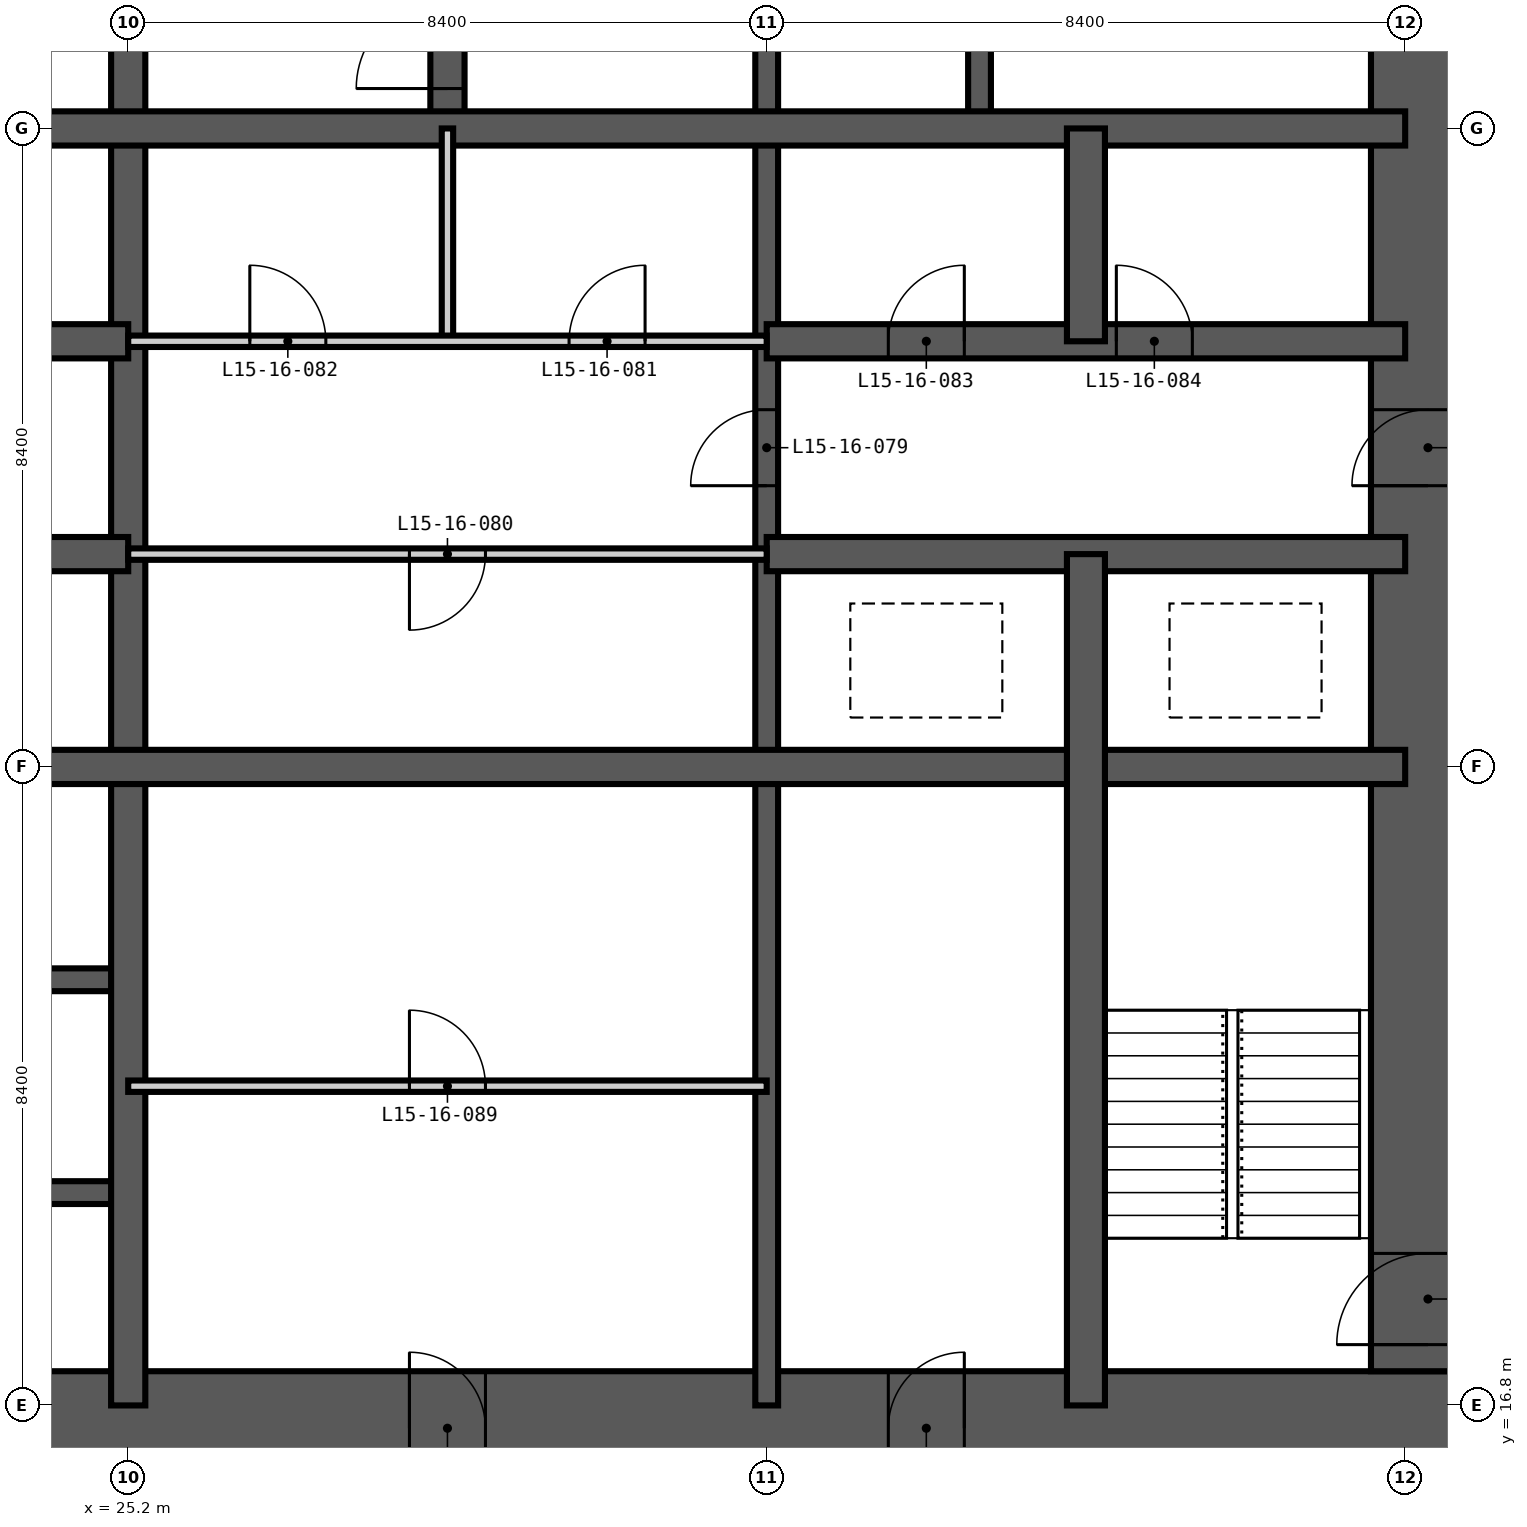
"""IFC4 building model, lengths in metres.
Left out: names, types, materials, properties, quantities, classifications, styles, units other than length and angle.
Written with IfcOpenShell. Run it as: python <this file> out.ifc"""

import sys

from ifc_helpers import new_model, si_unit, direction, frame, frame_2d, origin, place, context, subcontext, project, spatial, rectangle, extrude, element, fill, save


model = new_model("IFC4")
c1 = context("Model", 3, precision=1e-05, world=origin(), true_north=direction((0.0, 1.0)))
c2 = subcontext(c1, "Body", "Model", "MODEL_VIEW")
j1 = project(units=[si_unit("LENGTHUNIT", "METRE"), si_unit("PLANEANGLEUNIT", "RADIAN")], contexts=[c1])
p1 = place(None, origin())
s1 = spatial("IfcSite", under=j1, at=p1, CompositionType="ELEMENT")
p2 = place(p1, origin())
s2 = spatial("IfcBuilding", under=s1, at=p2, CompositionType="ELEMENT")
p3 = place(p2, frame((0.0, 0.0, 63.0)))
s3 = spatial("IfcBuildingStorey", under=s2, at=p3, CompositionType="ELEMENT", Elevation=63.0)
p4 = place(p3, frame((15.75, 16.5, -0.35), z_axis=(0.0, 0.0, 1.0), x_axis=(1.0, 0.0, 0.0)))
e1 = element("IfcWall", 1, at=p4, inside=s3, PredefinedType="SHEAR", context=c2, shape_type="SweptSolid", body=[
    extrude(rectangle(XDim=27.3, YDim=1.5, at=frame_2d((13.65, 0.0))), origin(), (0.0, 0.0, 1.0), 3.6),
])
p5 = place(p4, frame((13.15, 0.0, 0.35)))
e2 = element("IfcOpeningElement", 2, at=p5, cuts=e1, PredefinedType="OPENING", context=c2, shape_type="SweptSolid", body=[
    extrude(rectangle(XDim=1.0, YDim=2.1, at=frame_2d((0.5, 1.05))), frame((0.0, 0.76, 0.0), z_axis=(0.0, -1.0, 0.0), x_axis=(1.0, 0.0, 0.0)), (0.0, 0.0, 1.0), 1.52),
])
p6 = place(p4, frame((19.45, 0.0, 0.35)))
e3 = element("IfcOpeningElement", 3, at=p6, cuts=e1, PredefinedType="OPENING", context=c2, shape_type="SweptSolid", body=[
    extrude(rectangle(XDim=1.0, YDim=2.1, at=frame_2d((0.5, 1.05))), frame((0.0, 0.76, 0.0), z_axis=(0.0, -1.0, 0.0), x_axis=(1.0, 0.0, 0.0)), (0.0, 0.0, 1.0), 1.52),
])
p7 = place(p3, frame((42.3, 17.25, -0.35), z_axis=(0.0, 0.0, 1.0), x_axis=(0.0, 1.0, 0.0)))
e4 = element("IfcWall", 4, at=p7, inside=s3, PredefinedType="SHEAR", context=c2, shape_type="SweptSolid", body=[
    extrude(rectangle(XDim=24.3, YDim=1.5, at=frame_2d((12.15, 0.0))), origin(), (0.0, 0.0, 1.0), 3.6),
])
p8 = place(p7, frame((0.35, 0.0, 0.35)))
e5 = element("IfcOpeningElement", 5, at=p8, cuts=e4, PredefinedType="OPENING", context=c2, shape_type="SweptSolid", body=[
    extrude(rectangle(XDim=1.2, YDim=2.2, at=frame_2d((0.6, 1.1))), frame((0.0, 0.76, 0.0), z_axis=(0.0, -1.0, 0.0), x_axis=(1.0, 0.0, 0.0)), (0.0, 0.0, 1.0), 1.52),
])
p9 = place(p7, frame((11.65, 0.0, 0.35)))
e6 = element("IfcOpeningElement", 6, at=p9, cuts=e4, PredefinedType="OPENING", context=c2, shape_type="SweptSolid", body=[
    extrude(rectangle(XDim=1.0, YDim=2.1, at=frame_2d((0.5, 1.05))), frame((0.0, 0.76, 0.0), z_axis=(0.0, -1.0, 0.0), x_axis=(1.0, 0.0, 0.0)), (0.0, 0.0, 1.0), 1.52),
])
p10 = place(p7, frame((20.05, 0.0, 0.35)))
e7 = element("IfcOpeningElement", 7, at=p10, cuts=e4, PredefinedType="OPENING", context=c2, shape_type="SweptSolid", body=[
    extrude(rectangle(XDim=1.0, YDim=2.1, at=frame_2d((0.5, 1.05))), frame((0.0, 0.76, 0.0), z_axis=(0.0, -1.0, 0.0), x_axis=(1.0, 0.0, 0.0)), (0.0, 0.0, 1.0), 1.52),
])
p11 = place(p3, frame((33.6, 16.8, -0.35), z_axis=(0.0, 0.0, 1.0), x_axis=(0.0, 1.0, 0.0)))
e8 = element("IfcWall", 8, at=p11, inside=s3, PredefinedType="SHEAR", context=c2, shape_type="SweptSolid", body=[
    extrude(rectangle(XDim=25.2, YDim=0.3, at=frame_2d((12.6, 0.0))), origin(), (0.0, 0.0, 1.0), 3.6),
])
p12 = place(p11, frame((22.5, 0.0, 0.35)))
e9 = element("IfcOpeningElement", 9, at=p12, cuts=e8, PredefinedType="OPENING", context=c2, shape_type="SweptSolid", body=[
    extrude(rectangle(XDim=1.2, YDim=2.2, at=frame_2d((0.6, 1.1))), frame((0.0, 0.16, 0.0), z_axis=(0.0, -1.0, 0.0), x_axis=(1.0, 0.0, 0.0)), (0.0, 0.0, 1.0), 0.32),
])
p13 = place(p11, frame((18.3, 0.0, 0.35)))
e10 = element("IfcOpeningElement", 10, at=p13, cuts=e8, PredefinedType="OPENING", context=c2, shape_type="SweptSolid", body=[
    extrude(rectangle(XDim=1.2, YDim=2.2, at=frame_2d((0.6, 1.1))), frame((0.0, 0.16, 0.0), z_axis=(0.0, -1.0, 0.0), x_axis=(1.0, 0.0, 0.0)), (0.0, 0.0, 1.0), 0.32),
])
p14 = place(p11, frame((12.1, 0.0, 0.35)))
e11 = element("IfcOpeningElement", 11, at=p14, cuts=e8, PredefinedType="OPENING", context=c2, shape_type="SweptSolid", body=[
    extrude(rectangle(XDim=1.0, YDim=2.1, at=frame_2d((0.5, 1.05))), frame((0.0, 0.16, 0.0), z_axis=(0.0, -1.0, 0.0), x_axis=(1.0, 0.0, 0.0)), (0.0, 0.0, 1.0), 0.32),
])
for number, where, z_axis, x_axis in (
    (12, (36.4, 33.6, -0.35), (0.0, 0.0, 1.0), (0.0, 1.0, 0.0)),
    (13, (16.8, 19.6, -0.35), (0.0, 0.0, 1.0), (1.0, 0.0, 0.0)),
    (14, (16.8, 22.4, -0.35), (0.0, 0.0, 1.0), (1.0, 0.0, 0.0)),
):
    element("IfcWall", number, at=place(p3, frame(where, z_axis=z_axis, x_axis=x_axis)), inside=s3, PredefinedType="SHEAR", context=c2, shape_type="SweptSolid", body=[
        extrude(rectangle(XDim=8.4, YDim=0.3, at=frame_2d((4.2, 0.0))), origin(), (0.0, 0.0, 1.0), 3.6),
    ])
p15 = place(p3, frame((25.2, 16.8, -0.35), z_axis=(0.0, 0.0, 1.0), x_axis=(0.0, 1.0, 0.0)))
e15 = element("IfcWall", 15, at=p15, inside=s3, PredefinedType="SHEAR", context=c2, shape_type="SweptSolid", body=[
    extrude(rectangle(XDim=25.2, YDim=0.45, at=frame_2d((12.6, 0.0))), origin(), (0.0, 0.0, 1.0), 3.6),
])
p16 = place(p3, frame((29.4, 33.6, -0.35), z_axis=(0.0, 0.0, 1.0), x_axis=(0.0, 1.0, 0.0)))
e16 = element("IfcWall", 16, at=p16, inside=s3, PredefinedType="SHEAR", context=c2, shape_type="SweptSolid", body=[
    extrude(rectangle(XDim=8.4, YDim=0.45, at=frame_2d((4.2, 0.0))), origin(), (0.0, 0.0, 1.0), 3.6),
])
p17 = place(p16, frame((0.525, 0.0, 0.35)))
e17 = element("IfcOpeningElement", 17, at=p17, cuts=e16, PredefinedType="OPENING", context=c2, shape_type="SweptSolid", body=[
    extrude(rectangle(XDim=1.2, YDim=2.2, at=frame_2d((0.6, 1.1))), frame((0.0, 0.235, 0.0), z_axis=(0.0, -1.0, 0.0), x_axis=(1.0, 0.0, 0.0)), (0.0, 0.0, 1.0), 0.47),
])
p18 = place(p3, frame((16.8, 25.2, -0.35), z_axis=(0.0, 0.0, 1.0), x_axis=(1.0, 0.0, 0.0)))
e18 = element("IfcWall", 18, at=p18, inside=s3, PredefinedType="SHEAR", context=c2, shape_type="SweptSolid", body=[
    extrude(rectangle(XDim=25.2, YDim=0.45, at=frame_2d((12.6, 0.0))), origin(), (0.0, 0.0, 1.0), 3.6),
])
p19 = place(p3, frame((16.8, 28.0, -0.35), z_axis=(0.0, 0.0, 1.0), x_axis=(1.0, 0.0, 0.0)))
e19 = element("IfcWall", 19, at=p19, inside=s3, PredefinedType="SHEAR", context=c2, shape_type="SweptSolid", body=[
    extrude(rectangle(XDim=8.4, YDim=0.45, at=frame_2d((4.2, 0.0))), origin(), (0.0, 0.0, 1.0), 3.6),
])
p20 = place(p19, frame((1.55, 0.0, 0.35)))
e20 = element("IfcOpeningElement", 20, at=p20, cuts=e19, PredefinedType="OPENING", context=c2, shape_type="SweptSolid", body=[
    extrude(rectangle(XDim=1.1, YDim=2.2, at=frame_2d((0.55, 1.1))), frame((0.0, 0.235, 0.0), z_axis=(0.0, -1.0, 0.0), x_axis=(1.0, 0.0, 0.0)), (0.0, 0.0, 1.0), 0.47),
])
p21 = place(p19, frame((5.75, 0.0, 0.35)))
e21 = element("IfcOpeningElement", 21, at=p21, cuts=e19, PredefinedType="OPENING", context=c2, shape_type="SweptSolid", body=[
    extrude(rectangle(XDim=1.1, YDim=2.2, at=frame_2d((0.55, 1.1))), frame((0.0, 0.235, 0.0), z_axis=(0.0, -1.0, 0.0), x_axis=(1.0, 0.0, 0.0)), (0.0, 0.0, 1.0), 0.47),
])
p22 = place(p3, frame((33.6, 28.0, -0.35), z_axis=(0.0, 0.0, 1.0), x_axis=(1.0, 0.0, 0.0)))
e22 = element("IfcWall", 22, at=p22, inside=s3, PredefinedType="SHEAR", context=c2, shape_type="SweptSolid", body=[
    extrude(rectangle(XDim=8.4, YDim=0.45, at=frame_2d((4.2, 0.0))), origin(), (0.0, 0.0, 1.0), 3.6),
])
p23 = place(p3, frame((16.8, 30.8, -0.35), z_axis=(0.0, 0.0, 1.0), x_axis=(1.0, 0.0, 0.0)))
e23 = element("IfcWall", 23, at=p23, inside=s3, PredefinedType="SHEAR", context=c2, shape_type="SweptSolid", body=[
    extrude(rectangle(XDim=8.4, YDim=0.45, at=frame_2d((4.2, 0.0))), origin(), (0.0, 0.0, 1.0), 3.6),
])
p24 = place(p23, frame((1.55, 0.0, 0.35)))
e24 = element("IfcOpeningElement", 24, at=p24, cuts=e23, PredefinedType="OPENING", context=c2, shape_type="SweptSolid", body=[
    extrude(rectangle(XDim=1.1, YDim=2.2, at=frame_2d((0.55, 1.1))), frame((0.0, 0.235, 0.0), z_axis=(0.0, -1.0, 0.0), x_axis=(1.0, 0.0, 0.0)), (0.0, 0.0, 1.0), 0.47),
])
p25 = place(p23, frame((5.75, 0.0, 0.35)))
e25 = element("IfcOpeningElement", 25, at=p25, cuts=e23, PredefinedType="OPENING", context=c2, shape_type="SweptSolid", body=[
    extrude(rectangle(XDim=1.1, YDim=2.2, at=frame_2d((0.55, 1.1))), frame((0.0, 0.235, 0.0), z_axis=(0.0, -1.0, 0.0), x_axis=(1.0, 0.0, 0.0)), (0.0, 0.0, 1.0), 0.47),
])
p26 = place(p3, frame((33.6, 30.8, -0.35), z_axis=(0.0, 0.0, 1.0), x_axis=(1.0, 0.0, 0.0)))
e26 = element("IfcWall", 26, at=p26, inside=s3, PredefinedType="SHEAR", context=c2, shape_type="SweptSolid", body=[
    extrude(rectangle(XDim=8.4, YDim=0.45, at=frame_2d((4.2, 0.0))), origin(), (0.0, 0.0, 1.0), 3.6),
])
p27 = place(p26, frame((1.6, 0.0, 0.35)))
e27 = element("IfcOpeningElement", 27, at=p27, cuts=e26, PredefinedType="OPENING", context=c2, shape_type="SweptSolid", body=[
    extrude(rectangle(XDim=1.0, YDim=2.1, at=frame_2d((0.5, 1.05))), frame((0.0, 0.235, 0.0), z_axis=(0.0, -1.0, 0.0), x_axis=(1.0, 0.0, 0.0)), (0.0, 0.0, 1.0), 0.47),
])
p28 = place(p26, frame((4.6, 0.0, 0.35)))
e28 = element("IfcOpeningElement", 28, at=p28, cuts=e26, PredefinedType="OPENING", context=c2, shape_type="SweptSolid", body=[
    extrude(rectangle(XDim=1.0, YDim=2.1, at=frame_2d((0.5, 1.05))), frame((0.0, 0.235, 0.0), z_axis=(0.0, -1.0, 0.0), x_axis=(1.0, 0.0, 0.0)), (0.0, 0.0, 1.0), 0.47),
])
p29 = place(p3, frame((16.8, 33.6, -0.35), z_axis=(0.0, 0.0, 1.0), x_axis=(1.0, 0.0, 0.0)))
e29 = element("IfcWall", 29, at=p29, inside=s3, PredefinedType="SHEAR", context=c2, shape_type="SweptSolid", body=[
    extrude(rectangle(XDim=25.2, YDim=0.45, at=frame_2d((12.6, 0.0))), origin(), (0.0, 0.0, 1.0), 3.6),
])
p30 = place(p3, frame((37.8, 16.8, -0.35), z_axis=(0.0, 0.0, 1.0), x_axis=(0.0, 1.0, 0.0)))
e30 = element("IfcWall", 30, at=p30, inside=s3, PredefinedType="SHEAR", context=c2, shape_type="SweptSolid", body=[
    extrude(rectangle(XDim=11.2, YDim=0.5, at=frame_2d((5.6, 0.0))), origin(), (0.0, 0.0, 1.0), 3.6),
])
p31 = place(p3, frame((37.8, 30.8, -0.35), z_axis=(0.0, 0.0, 1.0), x_axis=(0.0, 1.0, 0.0)))
e31 = element("IfcWall", 31, at=p31, inside=s3, PredefinedType="SHEAR", context=c2, shape_type="SweptSolid", body=[
    extrude(rectangle(XDim=2.8, YDim=0.5, at=frame_2d((1.4, 0.0))), origin(), (0.0, 0.0, 1.0), 3.6),
])
p32 = place(p3, frame((29.4, 30.8, 0.0), z_axis=(0.0, 0.0, 1.0), x_axis=(0.0, 1.0, 0.0)))
e32 = element("IfcWall", 32, at=p32, inside=s3, PredefinedType="PARTITIONING", context=c2, shape_type="SweptSolid", body=[
    extrude(rectangle(XDim=2.8, YDim=0.15, at=frame_2d((1.4, 0.0))), origin(), (0.0, 0.0, 1.0), 3.25),
])
p33 = place(p3, frame((25.2, 21.0, 0.0), z_axis=(0.0, 0.0, 1.0), x_axis=(1.0, 0.0, 0.0)))
e33 = element("IfcWall", 33, at=p33, inside=s3, PredefinedType="PARTITIONING", context=c2, shape_type="SweptSolid", body=[
    extrude(rectangle(XDim=8.4, YDim=0.15, at=frame_2d((4.2, 0.0))), origin(), (0.0, 0.0, 1.0), 3.25),
])
p34 = place(p33, frame((3.7, 0.0, 0.0)))
e34 = element("IfcOpeningElement", 34, at=p34, cuts=e33, PredefinedType="OPENING", context=c2, shape_type="SweptSolid", body=[
    extrude(rectangle(XDim=1.0, YDim=2.1, at=frame_2d((0.5, 1.05))), frame((0.0, 0.085, 0.0), z_axis=(0.0, -1.0, 0.0), x_axis=(1.0, 0.0, 0.0)), (0.0, 0.0, 1.0), 0.17),
])
p35 = place(p3, frame((25.2, 28.0, 0.0), z_axis=(0.0, 0.0, 1.0), x_axis=(1.0, 0.0, 0.0)))
e35 = element("IfcWall", 35, at=p35, inside=s3, PredefinedType="PARTITIONING", context=c2, shape_type="SweptSolid", body=[
    extrude(rectangle(XDim=8.4, YDim=0.15, at=frame_2d((4.2, 0.0))), origin(), (0.0, 0.0, 1.0), 3.25),
])
p36 = place(p35, frame((3.7, 0.0, 0.0)))
e36 = element("IfcOpeningElement", 36, at=p36, cuts=e35, PredefinedType="OPENING", context=c2, shape_type="SweptSolid", body=[
    extrude(rectangle(XDim=1.0, YDim=2.1, at=frame_2d((0.5, 1.05))), frame((0.0, 0.085, 0.0), z_axis=(0.0, -1.0, 0.0), x_axis=(1.0, 0.0, 0.0)), (0.0, 0.0, 1.0), 0.17),
])
p37 = place(p3, frame((25.2, 30.8, 0.0), z_axis=(0.0, 0.0, 1.0), x_axis=(1.0, 0.0, 0.0)))
e37 = element("IfcWall", 37, at=p37, inside=s3, PredefinedType="PARTITIONING", context=c2, shape_type="SweptSolid", body=[
    extrude(rectangle(XDim=8.4, YDim=0.15, at=frame_2d((4.2, 0.0))), origin(), (0.0, 0.0, 1.0), 3.25),
])
p38 = place(p37, frame((5.8, 0.0, 0.0)))
e38 = element("IfcOpeningElement", 38, at=p38, cuts=e37, PredefinedType="OPENING", context=c2, shape_type="SweptSolid", body=[
    extrude(rectangle(XDim=1.0, YDim=2.1, at=frame_2d((0.5, 1.05))), frame((0.0, 0.085, 0.0), z_axis=(0.0, -1.0, 0.0), x_axis=(1.0, 0.0, 0.0)), (0.0, 0.0, 1.0), 0.17),
])
p39 = place(p37, frame((1.6, 0.0, 0.0)))
e39 = element("IfcOpeningElement", 39, at=p39, cuts=e37, PredefinedType="OPENING", context=c2, shape_type="SweptSolid", body=[
    extrude(rectangle(XDim=1.0, YDim=2.1, at=frame_2d((0.5, 1.05))), frame((0.0, 0.085, 0.0), z_axis=(0.0, -1.0, 0.0), x_axis=(1.0, 0.0, 0.0)), (0.0, 0.0, 1.0), 0.17),
])
p40 = place(p17, origin())
e40 = element("IfcDoor", 40, at=p40, inside=s3, OperationType="SINGLE_SWING_LEFT", PredefinedType="DOOR", context=c2, shape_type="SweptSolid", body=[
    extrude(rectangle(XDim=1.2, YDim=2.2, at=frame_2d((0.6, 1.1))), frame((0.0, 0.025, 0.0), z_axis=(0.0, -1.0, 0.0), x_axis=(1.0, 0.0, 0.0)), (0.0, 0.0, 1.0), 0.05),
])
fill(e17, e40)
p41 = place(p8, origin())
e41 = element("IfcDoor", 41, at=p41, inside=s3, OperationType="SINGLE_SWING_LEFT", PredefinedType="DOOR", context=c2, shape_type="SweptSolid", body=[
    extrude(rectangle(XDim=1.2, YDim=2.2, at=frame_2d((0.6, 1.1))), frame((0.0, 0.025, 0.0), z_axis=(0.0, -1.0, 0.0), x_axis=(1.0, 0.0, 0.0)), (0.0, 0.0, 1.0), 0.05),
])
fill(e5, e41)
p42 = place(p14, origin())
e42 = element("IfcDoor", 42, at=p42, inside=s3, OperationType="SINGLE_SWING_LEFT", PredefinedType="DOOR", context=c2, shape_type="SweptSolid", body=[
    extrude(rectangle(XDim=1.0, YDim=2.1, at=frame_2d((0.5, 1.05))), frame((0.0, 0.025, 0.0), z_axis=(0.0, -1.0, 0.0), x_axis=(1.0, 0.0, 0.0)), (0.0, 0.0, 1.0), 0.05),
])
fill(e11, e42)
p43 = place(p36, frame((1.0, 0.0, 0.0), z_axis=(0.0, 0.0, 1.0), x_axis=(-1.0, 0.0, 0.0)))
e43 = element("IfcDoor", 43, at=p43, inside=s3, OperationType="SINGLE_SWING_RIGHT", PredefinedType="DOOR", context=c2, shape_type="SweptSolid", body=[
    extrude(rectangle(XDim=1.0, YDim=2.1, at=frame_2d((0.5, 1.05))), frame((0.0, 0.025, 0.0), z_axis=(0.0, -1.0, 0.0), x_axis=(1.0, 0.0, 0.0)), (0.0, 0.0, 1.0), 0.05),
])
fill(e36, e43)
p44 = place(p38, origin())
e44 = element("IfcDoor", 44, at=p44, inside=s3, OperationType="SINGLE_SWING_RIGHT", PredefinedType="DOOR", context=c2, shape_type="SweptSolid", body=[
    extrude(rectangle(XDim=1.0, YDim=2.1, at=frame_2d((0.5, 1.05))), frame((0.0, 0.025, 0.0), z_axis=(0.0, -1.0, 0.0), x_axis=(1.0, 0.0, 0.0)), (0.0, 0.0, 1.0), 0.05),
])
fill(e38, e44)
p45 = place(p39, origin())
e45 = element("IfcDoor", 45, at=p45, inside=s3, OperationType="SINGLE_SWING_LEFT", PredefinedType="DOOR", context=c2, shape_type="SweptSolid", body=[
    extrude(rectangle(XDim=1.0, YDim=2.1, at=frame_2d((0.5, 1.05))), frame((0.0, 0.025, 0.0), z_axis=(0.0, -1.0, 0.0), x_axis=(1.0, 0.0, 0.0)), (0.0, 0.0, 1.0), 0.05),
])
fill(e39, e45)
p46 = place(p27, origin())
e46 = element("IfcDoor", 46, at=p46, inside=s3, OperationType="SINGLE_SWING_RIGHT", PredefinedType="DOOR", context=c2, shape_type="SweptSolid", body=[
    extrude(rectangle(XDim=1.0, YDim=2.1, at=frame_2d((0.5, 1.05))), frame((0.0, 0.025, 0.0), z_axis=(0.0, -1.0, 0.0), x_axis=(1.0, 0.0, 0.0)), (0.0, 0.0, 1.0), 0.05),
])
fill(e27, e46)
p47 = place(p28, origin())
e47 = element("IfcDoor", 47, at=p47, inside=s3, OperationType="SINGLE_SWING_LEFT", PredefinedType="DOOR", context=c2, shape_type="SweptSolid", body=[
    extrude(rectangle(XDim=1.0, YDim=2.1, at=frame_2d((0.5, 1.05))), frame((0.0, 0.025, 0.0), z_axis=(0.0, -1.0, 0.0), x_axis=(1.0, 0.0, 0.0)), (0.0, 0.0, 1.0), 0.05),
])
fill(e28, e47)
p48 = place(p9, origin())
e48 = element("IfcDoor", 48, at=p48, inside=s3, OperationType="SINGLE_SWING_LEFT", PredefinedType="DOOR", context=c2, shape_type="SweptSolid", body=[
    extrude(rectangle(XDim=1.0, YDim=2.1, at=frame_2d((0.5, 1.05))), frame((0.0, 0.025, 0.0), z_axis=(0.0, -1.0, 0.0), x_axis=(1.0, 0.0, 0.0)), (0.0, 0.0, 1.0), 0.05),
])
fill(e6, e48)
p49 = place(p5, origin())
e49 = element("IfcDoor", 49, at=p49, inside=s3, OperationType="SINGLE_SWING_LEFT", PredefinedType="DOOR", context=c2, shape_type="SweptSolid", body=[
    extrude(rectangle(XDim=1.0, YDim=2.1, at=frame_2d((0.5, 1.05))), frame((0.0, 0.025, 0.0), z_axis=(0.0, -1.0, 0.0), x_axis=(1.0, 0.0, 0.0)), (0.0, 0.0, 1.0), 0.05),
])
fill(e2, e49)
p50 = place(p34, origin())
e50 = element("IfcDoor", 50, at=p50, inside=s3, OperationType="SINGLE_SWING_LEFT", PredefinedType="DOOR", context=c2, shape_type="SweptSolid", body=[
    extrude(rectangle(XDim=1.0, YDim=2.1, at=frame_2d((0.5, 1.05))), frame((0.0, 0.025, 0.0), z_axis=(0.0, -1.0, 0.0), x_axis=(1.0, 0.0, 0.0)), (0.0, 0.0, 1.0), 0.05),
])
fill(e34, e50)
p51 = place(p6, origin())
e51 = element("IfcDoor", 51, at=p51, inside=s3, OperationType="SINGLE_SWING_RIGHT", PredefinedType="DOOR", context=c2, shape_type="SweptSolid", body=[
    extrude(rectangle(XDim=1.0, YDim=2.1, at=frame_2d((0.5, 1.05))), frame((0.0, 0.025, 0.0), z_axis=(0.0, -1.0, 0.0), x_axis=(1.0, 0.0, 0.0)), (0.0, 0.0, 1.0), 0.05),
])
fill(e3, e51)
save(model, sys.argv[1])
